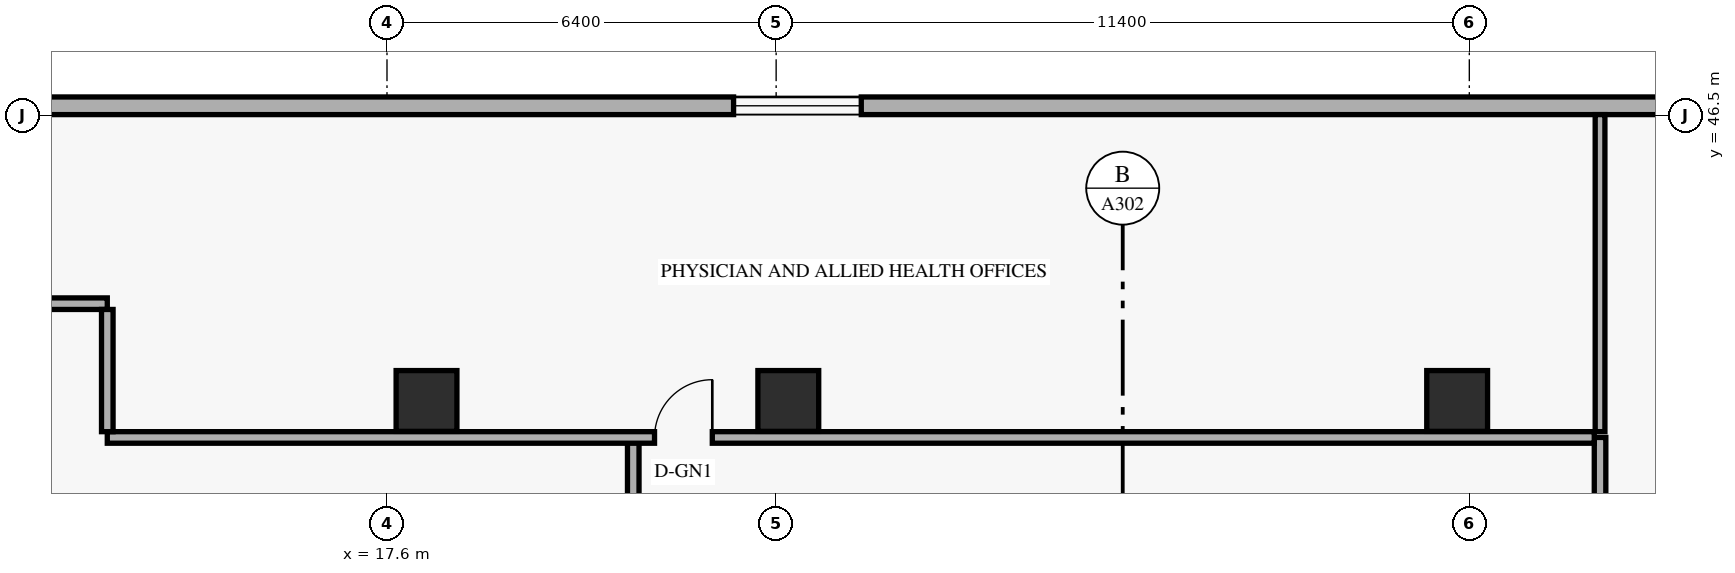
"""IFC4 building model, lengths in metres.
Left out: names, types, materials, properties, quantities, classifications, styles, units other than length and angle.
Written with IfcOpenShell. Run it as: python <this file> out.ifc"""

import sys

from ifc_helpers import new_model, si_unit, direction, frame, frame_2d, origin, origin_2d, place, context, subcontext, project, spatial, rectangle, extrude, element, fill, save


model = new_model("IFC4")
c1 = context("Model", 3, precision=1e-05, world=origin(), true_north=direction((0.0, 1.0)))
c2 = subcontext(c1, "Body", "Model", "MODEL_VIEW")
j1 = project(units=[si_unit("LENGTHUNIT", "METRE"), si_unit("PLANEANGLEUNIT", "RADIAN")], contexts=[c1])
p1 = place(None, origin())
s1 = spatial("IfcSite", under=j1, at=p1, CompositionType="ELEMENT")
p2 = place(p1, origin())
s2 = spatial("IfcBuilding", under=s1, at=p2, CompositionType="ELEMENT")
p3 = place(p2, frame((0.0, 0.0, 14.4)))
s3 = spatial("IfcBuildingStorey", under=s2, at=p3, CompositionType="ELEMENT", Elevation=14.4)
for number, where, z_axis, x_axis in (
    (1, (18.25, 41.8, 0.0), (0.0, 0.0, 1.0), (1.0, 0.0, 0.0)),
    (2, (24.2, 41.8, 0.0), (0.0, 0.0, 1.0), (1.0, 0.0, 0.0)),
    (3, (35.2, 41.8, 0.0), (0.0, 0.0, 1.0), (1.0, 0.0, 0.0)),
):
    element("IfcColumn", number, at=place(p3, frame(where, z_axis=z_axis, x_axis=x_axis)), inside=s3, PredefinedType="COLUMN", context=c2, shape_type="SweptSolid", body=[
        extrude(rectangle(XDim=1.0, YDim=1.0, at=origin_2d()), origin(), (0.0, 0.0, 1.0), 4.8),
    ])
p4 = place(p3, frame((48.18, 46.655, 0.0), z_axis=(0.0, 0.0, 1.0), x_axis=(-1.0, 0.0, 0.0)))
e4 = element("IfcWall", 4, at=p4, inside=s3, PredefinedType="SOLIDWALL", context=c2, shape_type="SweptSolid", body=[
    extrude(rectangle(XDim=42.76, YDim=0.29, at=frame_2d((21.38, 0.0))), origin(), (0.0, 0.0, 1.0), 4.39),
])
p5 = place(p4, frame((38.845, 0.0, 0.85)))
e5 = element("IfcOpeningElement", 5, at=p5, cuts=e4, PredefinedType="OPENING", context=c2, shape_type="SweptSolid", body=[
    extrude(rectangle(XDim=2.1, YDim=1.75, at=frame_2d((1.05, 0.875))), frame((0.0, 0.155, 0.0), z_axis=(0.0, -1.0, 0.0), x_axis=(1.0, 0.0, 0.0)), (0.0, 0.0, 1.0), 0.31),
])
p6 = place(p4, frame((22.78, 0.0, 0.85)))
e6 = element("IfcOpeningElement", 6, at=p6, cuts=e4, PredefinedType="OPENING", context=c2, shape_type="SweptSolid", body=[
    extrude(rectangle(XDim=2.1, YDim=1.75, at=frame_2d((1.05, 0.875))), frame((0.0, 0.155, 0.0), z_axis=(0.0, -1.0, 0.0), x_axis=(1.0, 0.0, 0.0)), (0.0, 0.0, 1.0), 0.31),
])
p7 = place(p4, frame((4.265, 0.0, 0.85)))
e7 = element("IfcOpeningElement", 7, at=p7, cuts=e4, PredefinedType="OPENING", context=c2, shape_type="SweptSolid", body=[
    extrude(rectangle(XDim=2.1, YDim=1.75, at=frame_2d((1.05, 0.875))), frame((0.0, 0.155, 0.0), z_axis=(0.0, -1.0, 0.0), x_axis=(1.0, 0.0, 0.0)), (0.0, 0.0, 1.0), 0.31),
])
p8 = place(p3, frame((21.65, 6.8, 0.0), z_axis=(0.0, 0.0, 1.0), x_axis=(0.0, 1.0, 0.0)))
e8 = element("IfcWall", 8, at=p8, inside=s3, PredefinedType="STANDARD", context=c2, shape_type="SweptSolid", body=[
    extrude(rectangle(XDim=34.4, YDim=0.19, at=frame_2d((17.2, 0.0))), origin(), (0.0, 0.0, 1.0), 3.445),
])
p9 = place(p8, frame((21.72, 0.0, 0.0)))
e9 = element("IfcOpeningElement", 9, at=p9, cuts=e8, PredefinedType="OPENING", context=c2, shape_type="SweptSolid", body=[
    extrude(rectangle(XDim=0.92, YDim=2.14, at=frame_2d((0.46, 1.07))), frame((0.0, 0.105, 0.0), z_axis=(0.0, -1.0, 0.0), x_axis=(1.0, 0.0, 0.0)), (0.0, 0.0, 1.0), 0.21),
])
p10 = place(p8, frame((28.2, 0.0, 0.0)))
e10 = element("IfcOpeningElement", 10, at=p10, cuts=e8, PredefinedType="OPENING", context=c2, shape_type="SweptSolid", body=[
    extrude(rectangle(XDim=0.95, YDim=2.15, at=frame_2d((0.475, 1.075))), frame((0.0, 0.105, 0.0), z_axis=(0.0, -1.0, 0.0), x_axis=(1.0, 0.0, 0.0)), (0.0, 0.0, 1.0), 0.21),
])
p11 = place(p8, frame((6.0, 0.0, 0.0)))
e11 = element("IfcOpeningElement", 11, at=p11, cuts=e8, PredefinedType="OPENING", context=c2, shape_type="SweptSolid", body=[
    extrude(rectangle(XDim=0.9, YDim=2.1, at=frame_2d((0.45, 1.05))), frame((0.0, 0.105, 0.0), z_axis=(0.0, -1.0, 0.0), x_axis=(1.0, 0.0, 0.0)), (0.0, 0.0, 1.0), 0.21),
])
p12 = place(p3, frame((37.55, 6.8, 0.0), z_axis=(0.0, 0.0, 1.0), x_axis=(0.0, 1.0, 0.0)))
e12 = element("IfcWall", 12, at=p12, inside=s3, PredefinedType="STANDARD", context=c2, shape_type="SweptSolid", body=[
    extrude(rectangle(XDim=34.4, YDim=0.19, at=frame_2d((17.2, 0.0))), origin(), (0.0, 0.0, 1.0), 3.445),
])
p13 = place(p12, frame((3.0, 0.0, 0.0)))
e13 = element("IfcOpeningElement", 13, at=p13, cuts=e12, PredefinedType="OPENING", context=c2, shape_type="SweptSolid", body=[
    extrude(rectangle(XDim=1.05, YDim=2.15, at=frame_2d((0.525, 1.075))), frame((0.0, 0.105, 0.0), z_axis=(0.0, -1.0, 0.0), x_axis=(1.0, 0.0, 0.0)), (0.0, 0.0, 1.0), 0.21),
])
p14 = place(p12, frame((18.145, 0.0, 0.0)))
e14 = element("IfcOpeningElement", 14, at=p14, cuts=e12, PredefinedType="OPENING", context=c2, shape_type="SweptSolid", body=[
    extrude(rectangle(XDim=1.2, YDim=2.15, at=frame_2d((0.6, 1.075))), frame((0.0, 0.105, 0.0), z_axis=(0.0, -1.0, 0.0), x_axis=(1.0, 0.0, 0.0)), (0.0, 0.0, 1.0), 0.21),
])
p15 = place(p12, frame((29.46, 0.0, 0.0)))
e15 = element("IfcOpeningElement", 15, at=p15, cuts=e12, PredefinedType="OPENING", context=c2, shape_type="SweptSolid", body=[
    extrude(rectangle(XDim=1.05, YDim=2.15, at=frame_2d((0.525, 1.075))), frame((0.0, 0.105, 0.0), z_axis=(0.0, -1.0, 0.0), x_axis=(1.0, 0.0, 0.0)), (0.0, 0.0, 1.0), 0.21),
])
p16 = place(p3, frame((13.0, 41.2, 0.0), z_axis=(0.0, 0.0, 1.0), x_axis=(1.0, 0.0, 0.0)))
e16 = element("IfcWall", 16, at=p16, inside=s3, PredefinedType="STANDARD", context=c2, shape_type="SweptSolid", body=[
    extrude(rectangle(XDim=24.455, YDim=0.19, at=frame_2d((12.228, 0.0))), origin(), (0.0, 0.0, 1.0), 3.602),
])
p17 = place(p16, frame((9.0, 0.0, 0.0)))
e17 = element("IfcOpeningElement", 17, at=p17, cuts=e16, PredefinedType="OPENING", context=c2, shape_type="SweptSolid", body=[
    extrude(rectangle(XDim=0.95, YDim=2.15, at=frame_2d((0.475, 1.075))), frame((0.0, 0.105, 0.0), z_axis=(0.0, -1.0, 0.0), x_axis=(1.0, 0.0, 0.0)), (0.0, 0.0, 1.0), 0.21),
])
p18 = place(p3, frame((11.15, 43.4, 0.0), z_axis=(0.0, 0.0, 1.0), x_axis=(1.0, 0.0, 0.0)))
e18 = element("IfcWall", 18, at=p18, inside=s3, PredefinedType="STANDARD", context=c2, shape_type="SweptSolid", body=[
    extrude(rectangle(XDim=1.85, YDim=0.19, at=frame_2d((0.925, 0.0))), origin(), (0.0, 0.0, 1.0), 4.39),
])
p19 = place(p3, frame((13.0, 41.295, 0.0), z_axis=(0.0, 0.0, 1.0), x_axis=(0.0, 1.0, 0.0)))
e19 = element("IfcWall", 19, at=p19, inside=s3, PredefinedType="STANDARD", context=c2, shape_type="SweptSolid", body=[
    extrude(rectangle(XDim=2.01, YDim=0.19, at=frame_2d((1.005, 0.0))), origin(), (0.0, 0.0, 1.0), 3.839),
])
p20 = place(p3, frame((37.55, 41.295, 0.0), z_axis=(0.0, 0.0, 1.0), x_axis=(0.0, 1.0, 0.0)))
e20 = element("IfcWall", 20, at=p20, inside=s3, PredefinedType="PARTITIONING", context=c2, shape_type="SweptSolid", body=[
    extrude(rectangle(XDim=5.215, YDim=0.16, at=frame_2d((2.607, 0.0))), origin(), (0.0, 0.0, 1.0), 3.839),
])
p21 = place(p6, origin())
e21 = element("IfcWindow", 21, at=p21, inside=s3, PartitioningType="SINGLE_PANEL", PredefinedType="WINDOW", context=c2, shape_type="SweptSolid", body=[
    extrude(rectangle(XDim=2.1, YDim=1.75, at=frame_2d((1.05, 0.875))), frame((0.0, 0.03, 0.0), z_axis=(0.0, -1.0, 0.0), x_axis=(1.0, 0.0, 0.0)), (0.0, 0.0, 1.0), 0.06),
])
fill(e6, e21)
p22 = place(p17, origin())
e22 = element("IfcDoor", 22, at=p22, inside=s3, OperationType="SINGLE_SWING_RIGHT", PredefinedType="DOOR", context=c2, shape_type="SweptSolid", body=[
    extrude(rectangle(XDim=0.95, YDim=2.15, at=frame_2d((0.475, 1.075))), frame((0.0, 0.025, 0.0), z_axis=(0.0, -1.0, 0.0), x_axis=(1.0, 0.0, 0.0)), (0.0, 0.0, 1.0), 0.05),
])
fill(e17, e22)
save(model, sys.argv[1])
